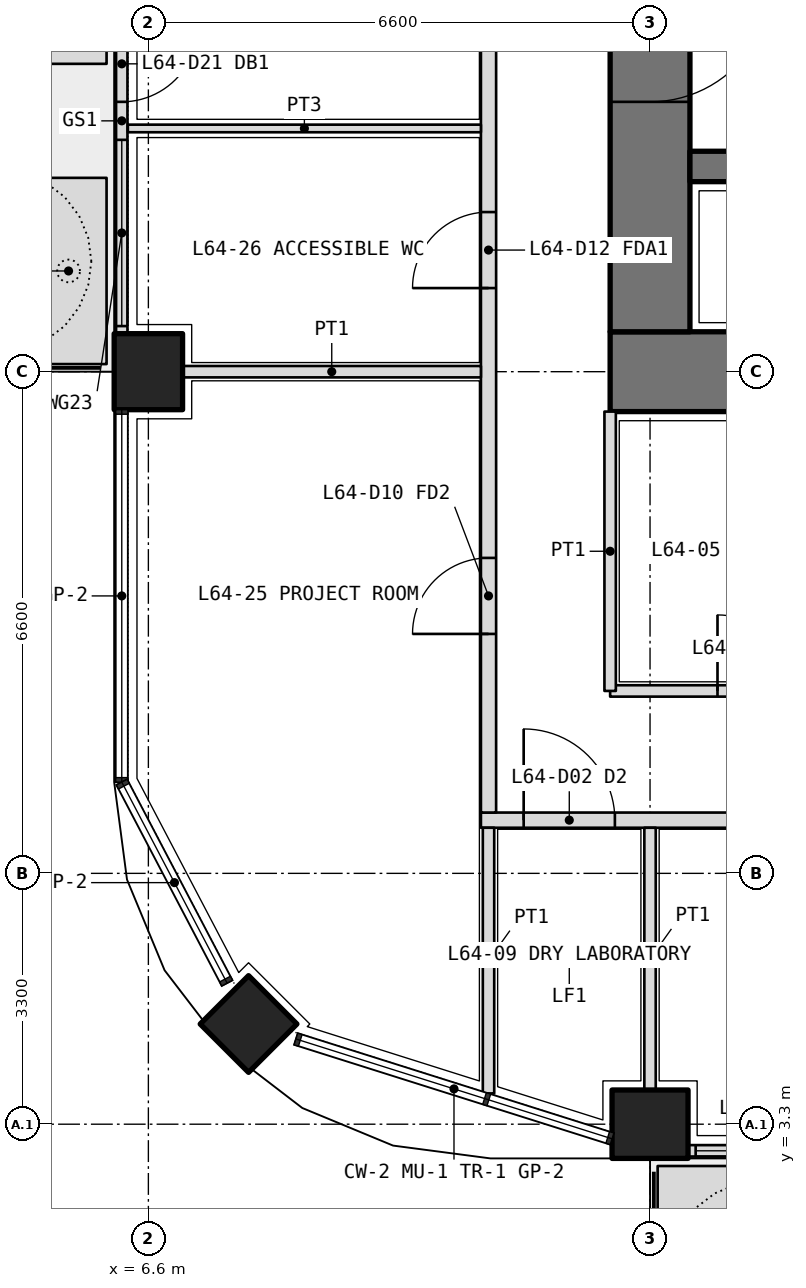
"""IFC4 building model, lengths in metres.
Left out: names, types, materials, properties, quantities, classifications, styles, units other than length and angle.
Written with IfcOpenShell. Run it as: python <this file> out.ifc"""

import sys

from ifc_helpers import new_model, si_unit, direction, frame, frame_2d, origin, origin_2d, place, context, subcontext, project, spatial, polyline, rectangle, outline, extrude, element, fill, save


model = new_model("IFC4")
c1 = context("Model", 3, precision=1e-05, world=origin(), true_north=direction((0.0, 1.0)))
c2 = subcontext(c1, "Body", "Model", "MODEL_VIEW")
j1 = project(units=[si_unit("LENGTHUNIT", "METRE"), si_unit("PLANEANGLEUNIT", "RADIAN")], contexts=[c1])
p1 = place(None, origin())
s1 = spatial("IfcSite", under=j1, at=p1, CompositionType="ELEMENT")
p2 = place(p1, origin())
s2 = spatial("IfcBuilding", under=s1, at=p2, CompositionType="ELEMENT")
p3 = place(p2, frame((0.0, 0.0, 279.6)))
s3 = spatial("IfcBuildingStorey", under=s2, at=p3, CompositionType="ELEMENT", Elevation=279.6)
p4 = place(p3, frame((7.918, 4.618, 0.0), z_axis=(0.0, 0.0, 1.0), x_axis=(0.707106781187, 0.707106781187, 0.0)))
e1 = element("IfcColumn", 1, at=p4, inside=s3, PredefinedType="COLUMN", context=c2, shape_type="SweptSolid", body=[
    extrude(rectangle(XDim=0.9, YDim=0.9, at=origin_2d()), origin(), (0.0, 0.0, 1.0), 4.2),
])
for number, where, z_axis, x_axis in (
    (2, (13.2, 3.3, 0.0), (0.0, 0.0, 1.0), (1.0, 0.0, 0.0)),
    (3, (6.6, 13.2, 0.0), (0.0, 0.0, 1.0), (0.0, 1.0, 0.0)),
):
    element("IfcColumn", number, at=place(p3, frame(where, z_axis=z_axis, x_axis=x_axis)), inside=s3, PredefinedType="COLUMN", context=c2, shape_type="SweptSolid", body=[
        extrude(rectangle(XDim=1.0, YDim=0.9, at=origin_2d()), origin(), (0.0, 0.0, 1.0), 4.2),
    ])
p5 = place(p3, origin())
e4 = element("IfcWall", 4, at=p5, inside=s3, PredefinedType="USERDEFINED", context=c2, shape_type="SweptSolid", body=[
    extrude(outline(polyline([(13.3, 1.75), (15.75, 1.75), (15.75, 2.75), (13.3, 2.75), (13.3, 1.75)]), holes=[polyline([(13.45, 1.9), (15.6, 1.9), (15.6, 2.6), (13.45, 2.6), (13.45, 1.9)])]), origin(), (0.0, 0.0, 1.0), 1.05),
])
p6 = place(p3, origin())
e5 = element("IfcWall", 5, at=p6, inside=s3, PredefinedType="USERDEFINED", context=c2, shape_type="SweptSolid", body=[
    extrude(outline(polyline([(5.05, 13.3), (6.05, 13.3), (6.05, 15.75), (5.05, 15.75), (5.05, 13.3)]), holes=[polyline([(5.2, 13.45), (5.9, 13.45), (5.9, 15.6), (5.2, 15.6), (5.2, 13.45)])]), origin(), (0.0, 0.0, 1.0), 1.05),
])
p7 = place(p3, origin())
e6 = element("IfcWall", 6, at=p7, inside=s3, PredefinedType="USERDEFINED", context=c2, shape_type="SweptSolid", body=[
    extrude(outline(polyline([(5.05, 17.25), (6.05, 17.25), (6.05, 26.3), (5.05, 26.3), (5.05, 17.25)]), holes=[polyline([(5.2, 17.4), (5.9, 17.4), (5.9, 26.15), (5.2, 26.15), (5.2, 17.4)])]), origin(), (0.0, 0.0, 1.0), 1.05),
])
p8 = place(p3, frame((13.7, 2.95, 0.0), z_axis=(0.0, 0.0, 1.0), x_axis=(1.0, 0.0, 0.0)))
e7 = element("IfcWall", 7, at=p8, inside=s3, PredefinedType="SOLIDWALL", context=c2, shape_type="SweptSolid", body=[
    extrude(rectangle(XDim=5.6, YDim=0.15, at=frame_2d((2.8, 0.0))), origin(), (0.0, 0.0, 1.0), 2.7),
])
p9 = place(p8, frame((3.05, 0.0, 0.0)))
e8 = element("IfcOpeningElement", 8, at=p9, cuts=e7, PredefinedType="OPENING", context=c2, shape_type="SweptSolid", body=[
    extrude(rectangle(XDim=1.0, YDim=2.4, at=frame_2d((0.5, 1.2))), frame((0.0, 0.085, 0.0), z_axis=(0.0, -1.0, 0.0), x_axis=(1.0, 0.0, 0.0)), (0.0, 0.0, 1.0), 0.17),
])
p10 = place(p8, frame((0.1, 0.0, 0.1)))
e9 = element("IfcOpeningElement", 9, at=p10, cuts=e7, PredefinedType="OPENING", context=c2, shape_type="SweptSolid", body=[
    extrude(rectangle(XDim=2.45, YDim=2.3, at=frame_2d((1.225, 1.15))), frame((0.0, 0.085, 0.0), z_axis=(0.0, -1.0, 0.0), x_axis=(1.0, 0.0, 0.0)), (0.0, 0.0, 1.0), 0.17),
])
p11 = place(p8, frame((4.15, 0.0, 0.1)))
e10 = element("IfcOpeningElement", 10, at=p11, cuts=e7, PredefinedType="OPENING", context=c2, shape_type="SweptSolid", body=[
    extrude(rectangle(XDim=1.35, YDim=2.3, at=frame_2d((0.675, 1.15))), frame((0.0, 0.085, 0.0), z_axis=(0.0, -1.0, 0.0), x_axis=(1.0, 0.0, 0.0)), (0.0, 0.0, 1.0), 0.17),
])
p12 = place(p3, frame((6.25, 19.3, 0.0), z_axis=(0.0, 0.0, 1.0), x_axis=(0.0, -1.0, 0.0)))
e11 = element("IfcWall", 11, at=p12, inside=s3, PredefinedType="SOLIDWALL", context=c2, shape_type="SweptSolid", body=[
    extrude(rectangle(XDim=5.6, YDim=0.15, at=frame_2d((2.8, 0.0))), origin(), (0.0, 0.0, 1.0), 2.7),
])
p13 = place(p12, frame((1.55, 0.0, 0.0)))
e12 = element("IfcOpeningElement", 12, at=p13, cuts=e11, PredefinedType="OPENING", context=c2, shape_type="SweptSolid", body=[
    extrude(rectangle(XDim=1.0, YDim=2.4, at=frame_2d((0.5, 1.2))), frame((0.0, 0.085, 0.0), z_axis=(0.0, -1.0, 0.0), x_axis=(1.0, 0.0, 0.0)), (0.0, 0.0, 1.0), 0.17),
])
p14 = place(p12, frame((0.1, 0.0, 0.1)))
e13 = element("IfcOpeningElement", 13, at=p14, cuts=e11, PredefinedType="OPENING", context=c2, shape_type="SweptSolid", body=[
    extrude(rectangle(XDim=1.35, YDim=2.3, at=frame_2d((0.675, 1.15))), frame((0.0, 0.085, 0.0), z_axis=(0.0, -1.0, 0.0), x_axis=(1.0, 0.0, 0.0)), (0.0, 0.0, 1.0), 0.17),
])
p15 = place(p12, frame((3.05, 0.0, 0.1)))
e14 = element("IfcOpeningElement", 14, at=p15, cuts=e11, PredefinedType="OPENING", context=c2, shape_type="SweptSolid", body=[
    extrude(rectangle(XDim=2.45, YDim=2.3, at=frame_2d((1.225, 1.15))), frame((0.0, 0.085, 0.0), z_axis=(0.0, -1.0, 0.0), x_axis=(1.0, 0.0, 0.0)), (0.0, 0.0, 1.0), 0.17),
])
p16 = place(p3, frame((12.675, 13.2, 0.0), z_axis=(0.0, 0.0, 1.0), x_axis=(1.0, 0.0, 0.0)))
e15 = element("IfcWall", 15, at=p16, inside=s3, PredefinedType="SHEAR", context=c2, shape_type="SweptSolid", body=[
    extrude(rectangle(XDim=27.45, YDim=1.05, at=frame_2d((13.725, 0.0))), origin(), (0.0, 0.0, 1.0), 4.2),
])
p17 = place(p3, frame((13.2, 32.475, 0.0), z_axis=(0.0, 0.0, 1.0), x_axis=(0.0, -1.0, 0.0)))
e16 = element("IfcWall", 16, at=p17, inside=s3, PredefinedType="SHEAR", context=c2, shape_type="SweptSolid", body=[
    extrude(rectangle(XDim=18.75, YDim=1.05, at=frame_2d((9.375, 0.0))), origin(), (0.0, 0.0, 1.0), 4.2),
])
p18 = place(p17, frame((14.125, 0.0, 0.0)))
e17 = element("IfcOpeningElement", 17, at=p18, cuts=e16, PredefinedType="OPENING", context=c2, shape_type="SweptSolid", body=[
    extrude(rectangle(XDim=1.6, YDim=2.1, at=frame_2d((0.8, 1.05))), frame((0.0, 0.535, 0.0), z_axis=(0.0, -1.0, 0.0), x_axis=(1.0, 0.0, 0.0)), (0.0, 0.0, 1.0), 1.07),
])
p19 = place(p17, frame((3.325, 0.0, 0.0)))
e18 = element("IfcOpeningElement", 18, at=p19, cuts=e16, PredefinedType="OPENING", context=c2, shape_type="SweptSolid", body=[
    extrude(rectangle(XDim=1.6, YDim=2.1, at=frame_2d((0.8, 1.05))), frame((0.0, 0.535, 0.0), z_axis=(0.0, -1.0, 0.0), x_axis=(1.0, 0.0, 0.0)), (0.0, 0.0, 1.0), 1.07),
])
p20 = place(p3, frame((13.725, 15.9, 0.0), z_axis=(0.0, 0.0, 1.0), x_axis=(1.0, 0.0, 0.0)))
e19 = element("IfcWall", 19, at=p20, inside=s3, PredefinedType="SHEAR", context=c2, shape_type="SweptSolid", body=[
    extrude(rectangle(XDim=25.35, YDim=0.4, at=frame_2d((12.675, 0.0))), origin(), (0.0, 0.0, 1.0), 4.2),
])
p21 = place(p20, frame((0.837, 0.0, 0.0)))
e20 = element("IfcOpeningElement", 20, at=p21, cuts=e19, PredefinedType="OPENING", context=c2, shape_type="SweptSolid", body=[
    extrude(rectangle(XDim=1.0, YDim=2.1, at=frame_2d((0.5, 1.05))), frame((0.0, 0.21, 0.0), z_axis=(0.0, -1.0, 0.0), x_axis=(1.0, 0.0, 0.0)), (0.0, 0.0, 1.0), 0.42),
])
p22 = place(p20, frame((3.925, 0.0, 0.0)))
e21 = element("IfcOpeningElement", 21, at=p22, cuts=e19, PredefinedType="OPENING", context=c2, shape_type="SweptSolid", body=[
    extrude(rectangle(XDim=1.0, YDim=2.1, at=frame_2d((0.5, 1.05))), frame((0.0, 0.21, 0.0), z_axis=(0.0, -1.0, 0.0), x_axis=(1.0, 0.0, 0.0)), (0.0, 0.0, 1.0), 0.42),
])
p23 = place(p20, frame((7.225, 0.0, 0.0)))
e22 = element("IfcOpeningElement", 22, at=p23, cuts=e19, PredefinedType="OPENING", context=c2, shape_type="SweptSolid", body=[
    extrude(rectangle(XDim=1.0, YDim=2.1, at=frame_2d((0.5, 1.05))), frame((0.0, 0.21, 0.0), z_axis=(0.0, -1.0, 0.0), x_axis=(1.0, 0.0, 0.0)), (0.0, 0.0, 1.0), 0.42),
])
p24 = place(p20, frame((10.525, 0.0, 0.0)))
e23 = element("IfcOpeningElement", 23, at=p24, cuts=e19, PredefinedType="OPENING", context=c2, shape_type="SweptSolid", body=[
    extrude(rectangle(XDim=1.0, YDim=2.1, at=frame_2d((0.5, 1.05))), frame((0.0, 0.21, 0.0), z_axis=(0.0, -1.0, 0.0), x_axis=(1.0, 0.0, 0.0)), (0.0, 0.0, 1.0), 0.42),
])
p25 = place(p20, frame((13.825, 0.0, 0.0)))
e24 = element("IfcOpeningElement", 24, at=p25, cuts=e19, PredefinedType="OPENING", context=c2, shape_type="SweptSolid", body=[
    extrude(rectangle(XDim=1.0, YDim=2.1, at=frame_2d((0.5, 1.05))), frame((0.0, 0.21, 0.0), z_axis=(0.0, -1.0, 0.0), x_axis=(1.0, 0.0, 0.0)), (0.0, 0.0, 1.0), 0.42),
])
p26 = place(p20, frame((17.125, 0.0, 0.0)))
e25 = element("IfcOpeningElement", 25, at=p26, cuts=e19, PredefinedType="OPENING", context=c2, shape_type="SweptSolid", body=[
    extrude(rectangle(XDim=1.0, YDim=2.1, at=frame_2d((0.5, 1.05))), frame((0.0, 0.21, 0.0), z_axis=(0.0, -1.0, 0.0), x_axis=(1.0, 0.0, 0.0)), (0.0, 0.0, 1.0), 0.42),
])
p27 = place(p20, frame((20.425, 0.0, 0.0)))
e26 = element("IfcOpeningElement", 26, at=p27, cuts=e19, PredefinedType="OPENING", context=c2, shape_type="SweptSolid", body=[
    extrude(rectangle(XDim=1.0, YDim=2.1, at=frame_2d((0.5, 1.05))), frame((0.0, 0.21, 0.0), z_axis=(0.0, -1.0, 0.0), x_axis=(1.0, 0.0, 0.0)), (0.0, 0.0, 1.0), 0.42),
])
p28 = place(p20, frame((23.512, 0.0, 0.0)))
e27 = element("IfcOpeningElement", 27, at=p28, cuts=e19, PredefinedType="OPENING", context=c2, shape_type="SweptSolid", body=[
    extrude(rectangle(XDim=1.0, YDim=2.1, at=frame_2d((0.5, 1.05))), frame((0.0, 0.21, 0.0), z_axis=(0.0, -1.0, 0.0), x_axis=(1.0, 0.0, 0.0)), (0.0, 0.0, 1.0), 0.42),
])
p29 = place(p3, frame((12.675, 9.0, 0.0), z_axis=(0.0, 0.0, 1.0), x_axis=(1.0, 0.0, 0.0)))
e28 = element("IfcWall", 28, at=p29, inside=s3, PredefinedType="PARTITIONING", context=c2, shape_type="SweptSolid", body=[
    extrude(rectangle(XDim=27.45, YDim=0.15, at=frame_2d((13.725, 0.0))), origin(), (0.0, 0.0, 1.0), 3.0),
])
p30 = place(p29, frame((1.413, 0.0, 0.0)))
e29 = element("IfcOpeningElement", 29, at=p30, cuts=e28, PredefinedType="OPENING", context=c2, shape_type="SweptSolid", body=[
    extrude(rectangle(XDim=1.0, YDim=2.1, at=frame_2d((0.5, 1.05))), frame((0.0, 0.085, 0.0), z_axis=(0.0, -1.0, 0.0), x_axis=(1.0, 0.0, 0.0)), (0.0, 0.0, 1.0), 0.17),
])
p31 = place(p29, frame((8.275, 0.0, 0.0)))
e30 = element("IfcOpeningElement", 30, at=p31, cuts=e28, PredefinedType="OPENING", context=c2, shape_type="SweptSolid", body=[
    extrude(rectangle(XDim=1.0, YDim=2.1, at=frame_2d((0.5, 1.05))), frame((0.0, 0.085, 0.0), z_axis=(0.0, -1.0, 0.0), x_axis=(1.0, 0.0, 0.0)), (0.0, 0.0, 1.0), 0.17),
])
p32 = place(p29, frame((14.875, 0.0, 0.0)))
e31 = element("IfcOpeningElement", 31, at=p32, cuts=e28, PredefinedType="OPENING", context=c2, shape_type="SweptSolid", body=[
    extrude(rectangle(XDim=1.0, YDim=2.1, at=frame_2d((0.5, 1.05))), frame((0.0, 0.085, 0.0), z_axis=(0.0, -1.0, 0.0), x_axis=(1.0, 0.0, 0.0)), (0.0, 0.0, 1.0), 0.17),
])
p33 = place(p29, frame((21.738, 0.0, 0.0)))
e32 = element("IfcOpeningElement", 32, at=p33, cuts=e28, PredefinedType="OPENING", context=c2, shape_type="SweptSolid", body=[
    extrude(rectangle(XDim=1.0, YDim=2.1, at=frame_2d((0.5, 1.05))), frame((0.0, 0.085, 0.0), z_axis=(0.0, -1.0, 0.0), x_axis=(1.0, 0.0, 0.0)), (0.0, 0.0, 1.0), 0.17),
])
p34 = place(p3, frame((12.675, 12.675, 0.0), z_axis=(0.0, 0.0, 1.0), x_axis=(0.0, -1.0, 0.0)))
e33 = element("IfcWall", 33, at=p34, inside=s3, PredefinedType="PARTITIONING", context=c2, shape_type="SweptSolid", body=[
    extrude(rectangle(XDim=3.675, YDim=0.15, at=frame_2d((1.837, 0.0))), origin(), (0.0, 0.0, 1.0), 3.0),
])
p35 = place(p3, frame((10.975, 7.3, 0.0), z_axis=(0.0, 0.0, 1.0), x_axis=(1.0, 0.0, 0.0)))
e34 = element("IfcWall", 34, at=p35, inside=s3, PredefinedType="PARTITIONING", context=c2, shape_type="SweptSolid", body=[
    extrude(rectangle(XDim=25.325, YDim=0.2, at=frame_2d((12.663, 0.0))), origin(), (0.0, 0.0, 1.0), 3.0),
])
p36 = place(p35, frame((0.562, 0.0, 0.0)))
e35 = element("IfcOpeningElement", 35, at=p36, cuts=e34, PredefinedType="OPENING", context=c2, shape_type="SweptSolid", body=[
    extrude(rectangle(XDim=1.2, YDim=2.1, at=frame_2d((0.6, 1.05))), frame((0.0, 0.11, 0.0), z_axis=(0.0, -1.0, 0.0), x_axis=(1.0, 0.0, 0.0)), (0.0, 0.0, 1.0), 0.22),
])
p37 = place(p35, frame((11.625, 0.0, 0.0)))
e36 = element("IfcOpeningElement", 36, at=p37, cuts=e34, PredefinedType="OPENING", context=c2, shape_type="SweptSolid", body=[
    extrude(rectangle(XDim=1.0, YDim=2.1, at=frame_2d((0.5, 1.05))), frame((0.0, 0.11, 0.0), z_axis=(0.0, -1.0, 0.0), x_axis=(1.0, 0.0, 0.0)), (0.0, 0.0, 1.0), 0.22),
])
p38 = place(p35, frame((23.175, 0.0, 0.0)))
e37 = element("IfcOpeningElement", 37, at=p38, cuts=e34, PredefinedType="OPENING", context=c2, shape_type="SweptSolid", body=[
    extrude(rectangle(XDim=1.0, YDim=2.1, at=frame_2d((0.5, 1.05))), frame((0.0, 0.11, 0.0), z_axis=(0.0, -1.0, 0.0), x_axis=(1.0, 0.0, 0.0)), (0.0, 0.0, 1.0), 0.22),
])
p39 = place(p3, frame((11.075, 7.4, 0.0), z_axis=(0.0, 0.0, 1.0), x_axis=(0.0, 1.0, 0.0)))
e38 = element("IfcWall", 38, at=p39, inside=s3, PredefinedType="PARTITIONING", context=c2, shape_type="SweptSolid", body=[
    extrude(rectangle(XDim=31.4, YDim=0.2, at=frame_2d((15.7, 0.0))), origin(), (0.0, 0.0, 1.0), 3.0),
])
p40 = place(p39, frame((2.35, 0.0, 0.0)))
e39 = element("IfcOpeningElement", 39, at=p40, cuts=e38, PredefinedType="OPENING", context=c2, shape_type="SweptSolid", body=[
    extrude(rectangle(XDim=1.0, YDim=2.1, at=frame_2d((0.5, 1.05))), frame((0.0, 0.11, 0.0), z_axis=(0.0, -1.0, 0.0), x_axis=(1.0, 0.0, 0.0)), (0.0, 0.0, 1.0), 0.22),
])
p41 = place(p39, frame((6.9, 0.0, 0.0)))
e40 = element("IfcOpeningElement", 40, at=p41, cuts=e38, PredefinedType="OPENING", context=c2, shape_type="SweptSolid", body=[
    extrude(rectangle(XDim=1.0, YDim=2.1, at=frame_2d((0.5, 1.05))), frame((0.0, 0.11, 0.0), z_axis=(0.0, -1.0, 0.0), x_axis=(1.0, 0.0, 0.0)), (0.0, 0.0, 1.0), 0.22),
])
p42 = place(p39, frame((10.35, 0.0, 0.0)))
e41 = element("IfcOpeningElement", 41, at=p42, cuts=e38, PredefinedType="OPENING", context=c2, shape_type="SweptSolid", body=[
    extrude(rectangle(XDim=0.9, YDim=2.1, at=frame_2d((0.45, 1.05))), frame((0.0, 0.11, 0.0), z_axis=(0.0, -1.0, 0.0), x_axis=(1.0, 0.0, 0.0)), (0.0, 0.0, 1.0), 0.22),
])
p43 = place(p39, frame((13.7, 0.0, 0.0)))
e42 = element("IfcOpeningElement", 42, at=p43, cuts=e38, PredefinedType="OPENING", context=c2, shape_type="SweptSolid", body=[
    extrude(rectangle(XDim=0.9, YDim=2.1, at=frame_2d((0.45, 1.05))), frame((0.0, 0.11, 0.0), z_axis=(0.0, -1.0, 0.0), x_axis=(1.0, 0.0, 0.0)), (0.0, 0.0, 1.0), 0.22),
])
p44 = place(p39, frame((23.1, 0.0, 0.0)))
e43 = element("IfcOpeningElement", 43, at=p44, cuts=e38, PredefinedType="OPENING", context=c2, shape_type="SweptSolid", body=[
    extrude(rectangle(XDim=1.0, YDim=2.1, at=frame_2d((0.5, 1.05))), frame((0.0, 0.11, 0.0), z_axis=(0.0, -1.0, 0.0), x_axis=(1.0, 0.0, 0.0)), (0.0, 0.0, 1.0), 0.22),
])
p45 = place(p3, frame((11.075, 3.705, 0.0), z_axis=(0.0, 0.0, 1.0), x_axis=(0.0, 1.0, 0.0)))
e44 = element("IfcWall", 44, at=p45, inside=s3, PredefinedType="PARTITIONING", context=c2, shape_type="SweptSolid", body=[
    extrude(rectangle(XDim=3.495, YDim=0.15, at=frame_2d((1.748, 0.0))), origin(), (0.0, 0.0, 1.0), 2.7),
])
p46 = place(p3, frame((13.2, 3.75, 0.0), z_axis=(0.0, 0.0, 1.0), x_axis=(0.0, 1.0, 0.0)))
e45 = element("IfcWall", 45, at=p46, inside=s3, PredefinedType="PARTITIONING", context=c2, shape_type="SweptSolid", body=[
    extrude(rectangle(XDim=3.45, YDim=0.15, at=frame_2d((1.725, 0.0))), origin(), (0.0, 0.0, 1.0), 3.0),
])
p47 = place(p3, frame((6.33, 16.4, 0.0), z_axis=(0.0, 0.0, 1.0), x_axis=(1.0, 0.0, 0.0)))
e46 = element("IfcWall", 46, at=p47, inside=s3, PredefinedType="PARTITIONING", context=c2, shape_type="SweptSolid", body=[
    extrude(rectangle(XDim=4.645, YDim=0.1, at=frame_2d((2.323, 0.0))), origin(), (0.0, 0.0, 1.0), 2.7),
])
p48 = place(p3, frame((7.05, 13.2, 0.0), z_axis=(0.0, 0.0, 1.0), x_axis=(1.0, 0.0, 0.0)))
e47 = element("IfcWall", 47, at=p48, inside=s3, PredefinedType="PARTITIONING", context=c2, shape_type="SweptSolid", body=[
    extrude(rectangle(XDim=3.925, YDim=0.15, at=frame_2d((1.962, 0.0))), origin(), (0.0, 0.0, 1.0), 3.0),
])
p49 = place(p10, origin())
e48 = element("IfcWindow", 48, at=p49, inside=s3, PartitioningType="SINGLE_PANEL", PredefinedType="WINDOW", context=c2, shape_type="SweptSolid", body=[
    extrude(rectangle(XDim=2.45, YDim=2.3, at=frame_2d((1.225, 1.15))), frame((0.0, 0.03, 0.0), z_axis=(0.0, -1.0, 0.0), x_axis=(1.0, 0.0, 0.0)), (0.0, 0.0, 1.0), 0.06),
])
fill(e9, e48)
p50 = place(p13, origin())
e49 = element("IfcDoor", 49, at=p50, inside=s3, OperationType="SINGLE_SWING_LEFT", PredefinedType="DOOR", context=c2, shape_type="SweptSolid", body=[
    extrude(rectangle(XDim=1.0, YDim=2.4, at=frame_2d((0.5, 1.2))), frame((0.0, 0.025, 0.0), z_axis=(0.0, -1.0, 0.0), x_axis=(1.0, 0.0, 0.0)), (0.0, 0.0, 1.0), 0.05),
])
fill(e12, e49)
p51 = place(p15, origin())
e50 = element("IfcWindow", 50, at=p51, inside=s3, PartitioningType="SINGLE_PANEL", PredefinedType="WINDOW", context=c2, shape_type="SweptSolid", body=[
    extrude(rectangle(XDim=2.45, YDim=2.3, at=frame_2d((1.225, 1.15))), frame((0.0, 0.03, 0.0), z_axis=(0.0, -1.0, 0.0), x_axis=(1.0, 0.0, 0.0)), (0.0, 0.0, 1.0), 0.06),
])
fill(e14, e50)
p52 = place(p30, origin())
e51 = element("IfcDoor", 51, at=p52, inside=s3, OperationType="SINGLE_SWING_LEFT", PredefinedType="DOOR", context=c2, shape_type="SweptSolid", body=[
    extrude(rectangle(XDim=1.0, YDim=2.1, at=frame_2d((0.5, 1.05))), frame((0.0, 0.025, 0.0), z_axis=(0.0, -1.0, 0.0), x_axis=(1.0, 0.0, 0.0)), (0.0, 0.0, 1.0), 0.05),
])
fill(e29, e51)
p53 = place(p36, origin())
e52 = element("IfcDoor", 52, at=p53, inside=s3, OperationType="DOUBLE_DOOR_SINGLE_SWING", PredefinedType="DOOR", context=c2, shape_type="SweptSolid", body=[
    extrude(rectangle(XDim=1.2, YDim=2.1, at=frame_2d((0.6, 1.05))), frame((0.0, 0.025, 0.0), z_axis=(0.0, -1.0, 0.0), x_axis=(1.0, 0.0, 0.0)), (0.0, 0.0, 1.0), 0.05),
])
fill(e35, e52)
p54 = place(p40, origin())
e53 = element("IfcDoor", 53, at=p54, inside=s3, OperationType="SINGLE_SWING_LEFT", PredefinedType="DOOR", context=c2, shape_type="SweptSolid", body=[
    extrude(rectangle(XDim=1.0, YDim=2.1, at=frame_2d((0.5, 1.05))), frame((0.0, 0.025, 0.0), z_axis=(0.0, -1.0, 0.0), x_axis=(1.0, 0.0, 0.0)), (0.0, 0.0, 1.0), 0.05),
])
fill(e39, e53)
p55 = place(p41, origin())
e54 = element("IfcDoor", 54, at=p55, inside=s3, OperationType="SINGLE_SWING_LEFT", PredefinedType="DOOR", context=c2, shape_type="SweptSolid", body=[
    extrude(rectangle(XDim=1.0, YDim=2.1, at=frame_2d((0.5, 1.05))), frame((0.0, 0.025, 0.0), z_axis=(0.0, -1.0, 0.0), x_axis=(1.0, 0.0, 0.0)), (0.0, 0.0, 1.0), 0.05),
])
fill(e40, e54)
p56 = place(p18, origin())
e55 = element("IfcDoor", 55, at=p56, inside=s3, OperationType="DOUBLE_DOOR_DOUBLE_SWING", PredefinedType="DOOR", context=c2, shape_type="SweptSolid", body=[
    extrude(rectangle(XDim=1.6, YDim=2.1, at=frame_2d((0.8, 1.05))), frame((0.0, 0.025, 0.0), z_axis=(0.0, -1.0, 0.0), x_axis=(1.0, 0.0, 0.0)), (0.0, 0.0, 1.0), 0.05),
])
fill(e17, e55)
save(model, sys.argv[1])
